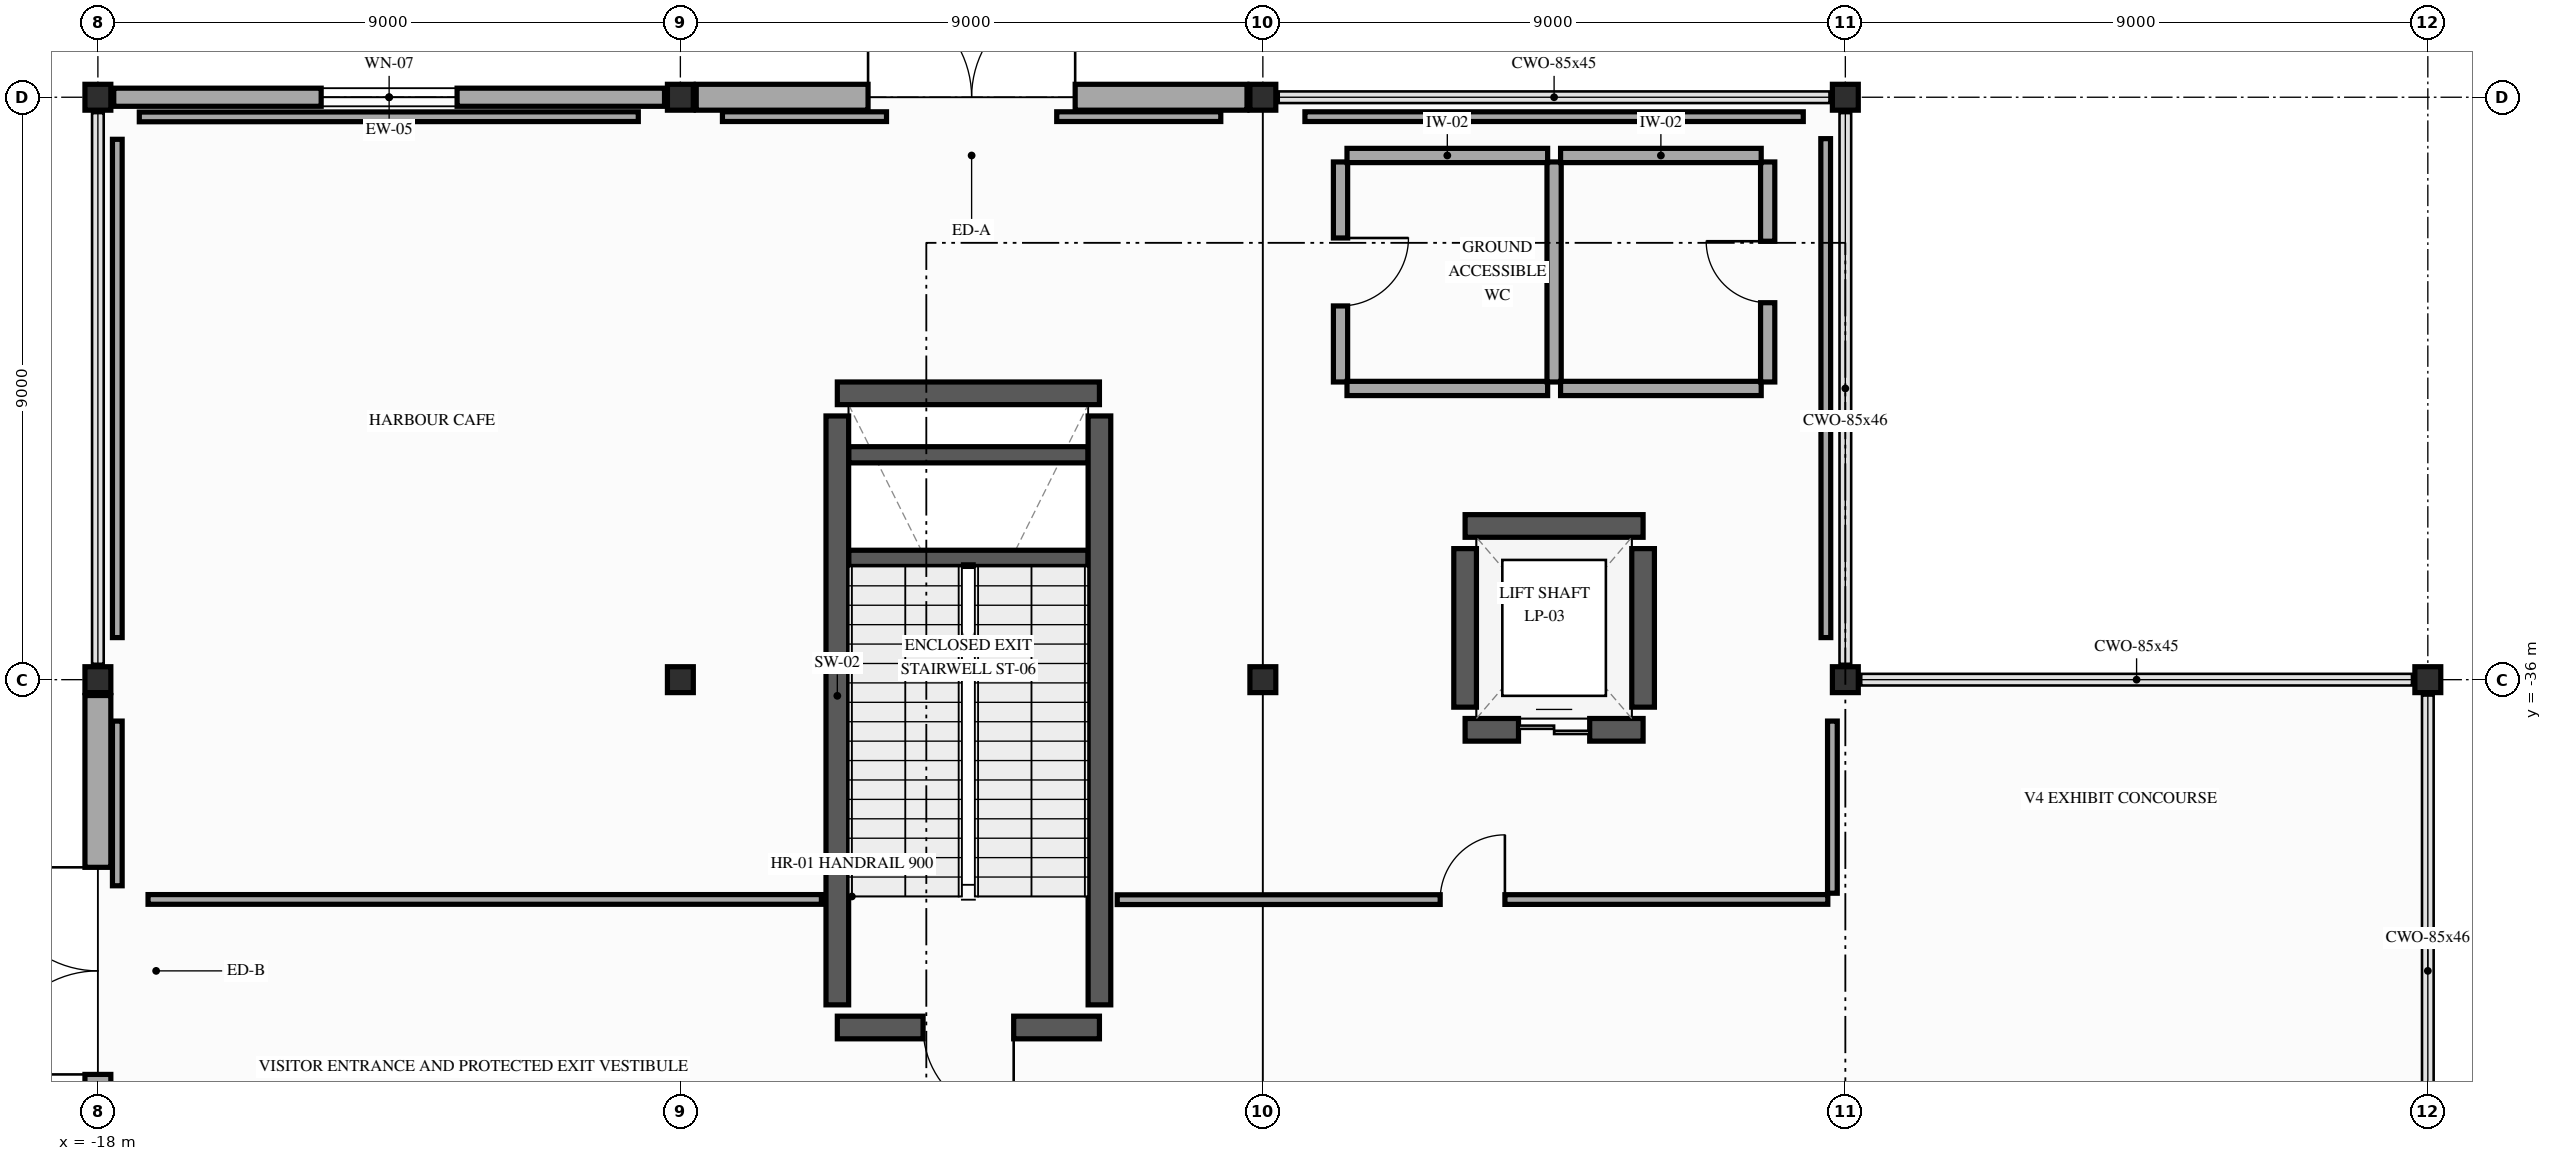
"""IFC4 building model, lengths in metres.
Left out: names, types, materials, properties, quantities, classifications, styles, units other than length and angle.
Written with IfcOpenShell. Run it as: python <this file> out.ifc"""

import sys

from ifc_helpers import new_model, si_unit, direction, frame, frame_2d, origin, origin_2d, place, context, subcontext, project, spatial, rectangle, i_section, extrude, element, fill, save


model = new_model("IFC4")
c1 = context("Model", 3, precision=1e-05, world=origin(), true_north=direction((0.0, 1.0)))
c2 = subcontext(c1, "Body", "Model", "MODEL_VIEW")
j1 = project(units=[si_unit("LENGTHUNIT", "METRE"), si_unit("PLANEANGLEUNIT", "RADIAN")], contexts=[c1])
p1 = place(None, origin())
s1 = spatial("IfcSite", under=j1, at=p1, CompositionType="ELEMENT")
p2 = place(p1, origin())
s2 = spatial("IfcBuilding", under=s1, at=p2, CompositionType="ELEMENT")
p3 = place(p2, origin())
s3 = spatial("IfcBuildingStorey", under=s2, at=p3, CompositionType="ELEMENT", Elevation=0.0)
for number, where, z_axis, x_axis in (
    (1, (-18.0, -36.0, 0.0), (0.0, 0.0, 1.0), (1.0, 0.0, 0.0)),
    (2, (-18.0, -27.0, 0.0), (0.0, 0.0, 1.0), (1.0, 0.0, 0.0)),
    (3, (-9.0, -36.0, 0.0), (0.0, 0.0, 1.0), (1.0, 0.0, 0.0)),
    (4, (-9.0, -27.0, 0.0), (0.0, 0.0, 1.0), (1.0, 0.0, 0.0)),
    (5, (0.0, -36.0, 0.0), (0.0, 0.0, 1.0), (1.0, 0.0, 0.0)),
    (6, (0.0, -27.0, 0.0), (0.0, 0.0, 1.0), (1.0, 0.0, 0.0)),
    (7, (9.0, -36.0, 0.0), (0.0, 0.0, 1.0), (1.0, 0.0, 0.0)),
    (8, (9.0, -27.0, 0.0), (0.0, 0.0, 1.0), (1.0, 0.0, 0.0)),
    (9, (18.0, -36.0, 0.0), (0.0, 0.0, 1.0), (1.0, 0.0, 0.0)),
):
    element("IfcColumn", number, at=place(p3, frame(where, z_axis=z_axis, x_axis=x_axis)), inside=s3, PredefinedType="COLUMN", context=c2, shape_type="SweptSolid", body=[
        extrude(i_section(OverallWidth=0.4, OverallDepth=0.4, WebThickness=0.013, FlangeThickness=0.021, FilletRadius=0.022, at=origin_2d()), origin(), (0.0, 0.0, 1.0), 5.4),
    ])
p4 = place(p3, frame((-17.755, -27.0, 0.0), z_axis=(0.0, 0.0, 1.0), x_axis=(1.0, 0.0, 0.0)))
e10 = element("IfcWall", 10, at=p4, inside=s3, PredefinedType="SOLIDWALL", context=c2, shape_type="SweptSolid", body=[
    extrude(rectangle(XDim=8.51, YDim=0.28, at=frame_2d((4.255, 0.0))), origin(), (0.0, 0.0, 1.0), 4.517),
])
p5 = place(p4, frame((3.205, 0.0, 0.9)))
e11 = element("IfcOpeningElement", 11, at=p5, cuts=e10, PredefinedType="OPENING", context=c2, shape_type="SweptSolid", body=[
    extrude(rectangle(XDim=2.1, YDim=2.6, at=frame_2d((1.05, 1.3))), frame((0.0, 0.15, 0.0), z_axis=(0.0, -1.0, 0.0), x_axis=(1.0, 0.0, 0.0)), (0.0, 0.0, 1.0), 0.3),
])
p6 = place(p3, frame((-8.755, -27.0, 0.0), z_axis=(0.0, 0.0, 1.0), x_axis=(1.0, 0.0, 0.0)))
e12 = element("IfcWall", 12, at=p6, inside=s3, PredefinedType="SOLIDWALL", context=c2, shape_type="SweptSolid", body=[
    extrude(rectangle(XDim=8.51, YDim=0.4, at=frame_2d((4.255, 0.0))), origin(), (0.0, 0.0, 1.0), 4.517),
])
p7 = place(p6, frame((2.655, 0.0, 0.0)))
e13 = element("IfcOpeningElement", 13, at=p7, cuts=e12, PredefinedType="OPENING", context=c2, shape_type="SweptSolid", body=[
    extrude(rectangle(XDim=3.2, YDim=3.0, at=frame_2d((1.6, 1.5))), frame((0.0, 0.21, 0.0), z_axis=(0.0, -1.0, 0.0), x_axis=(1.0, 0.0, 0.0)), (0.0, 0.0, 1.0), 0.42),
])
p8 = place(p3, frame((-18.0, -44.755, 0.0), z_axis=(0.0, 0.0, 1.0), x_axis=(0.0, 1.0, 0.0)))
e14 = element("IfcWall", 14, at=p8, inside=s3, PredefinedType="SOLIDWALL", context=c2, shape_type="SweptSolid", body=[
    extrude(rectangle(XDim=8.51, YDim=0.4, at=frame_2d((4.255, 0.0))), origin(), (0.0, 0.0, 1.0), 4.517),
])
p9 = place(p8, frame((2.655, 0.0, 0.0)))
e15 = element("IfcOpeningElement", 15, at=p9, cuts=e14, PredefinedType="OPENING", context=c2, shape_type="SweptSolid", body=[
    extrude(rectangle(XDim=3.2, YDim=2.8, at=frame_2d((1.6, 1.4))), frame((0.0, 0.21, 0.0), z_axis=(0.0, -1.0, 0.0), x_axis=(1.0, 0.0, 0.0)), (0.0, 0.0, 1.0), 0.42),
])
for number, where, z_axis, x_axis in (
    (16, (-6.4, -34.125, 0.0), (0.0, 0.0, 1.0), (1.0, 0.0, 0.0)),
    (17, (-6.4, -32.525, 0.0), (0.0, 0.0, 1.0), (1.0, 0.0, 0.0)),
):
    element("IfcWall", number, at=place(p3, frame(where, z_axis=z_axis, x_axis=x_axis)), inside=s3, PredefinedType="SHEAR", context=c2, shape_type="SweptSolid", body=[
        extrude(rectangle(XDim=3.7, YDim=0.25, at=frame_2d((1.85, 0.0))), origin(), (0.0, 0.0, 1.0), 2.5),
    ])
p10 = place(p3, frame((-2.525, -41.375, 0.0), z_axis=(0.0, 0.0, 1.0), x_axis=(-1.0, 0.0, 0.0)))
e18 = element("IfcWall", 18, at=p10, inside=s3, PredefinedType="SHEAR", context=c2, shape_type="SweptSolid", body=[
    extrude(rectangle(XDim=4.05, YDim=0.35, at=frame_2d((2.025, 0.0))), origin(), (0.0, 0.0, 1.0), 5.12),
])
p11 = place(p10, frame((1.325, 0.0, 0.0)))
e19 = element("IfcOpeningElement", 19, at=p11, cuts=e18, PredefinedType="OPENING", context=c2, shape_type="SweptSolid", body=[
    extrude(rectangle(XDim=1.4, YDim=2.2, at=frame_2d((0.7, 1.1))), frame((0.0, 0.185, 0.0), z_axis=(0.0, -1.0, 0.0), x_axis=(1.0, 0.0, 0.0)), (0.0, 0.0, 1.0), 0.37),
])
p12 = place(p3, frame((-6.575, -31.575, 0.0), z_axis=(0.0, 0.0, 1.0), x_axis=(1.0, 0.0, 0.0)))
e20 = element("IfcWall", 20, at=p12, inside=s3, PredefinedType="SHEAR", context=c2, shape_type="SweptSolid", body=[
    extrude(rectangle(XDim=4.05, YDim=0.35, at=frame_2d((2.025, 0.0))), origin(), (0.0, 0.0, 1.0), 5.12),
])
for number, where, z_axis, x_axis in (
    (21, (-6.575, -41.025, 0.0), (0.0, 0.0, 1.0), (0.0, 1.0, 0.0)),
    (22, (-2.525, -41.025, 0.0), (0.0, 0.0, 1.0), (0.0, 1.0, 0.0)),
):
    element("IfcWall", number, at=place(p3, frame(where, z_axis=z_axis, x_axis=x_axis)), inside=s3, PredefinedType="SHEAR", context=c2, shape_type="SweptSolid", body=[
        extrude(rectangle(XDim=9.1, YDim=0.35, at=frame_2d((4.55, 0.0))), origin(), (0.0, 0.0, 1.0), 5.12),
    ])
p13 = place(p3, frame((3.125, -36.775, 0.0), z_axis=(0.0, 0.0, 1.0), x_axis=(1.0, 0.0, 0.0)))
e23 = element("IfcWall", 23, at=p13, inside=s3, PredefinedType="SHEAR", context=c2, shape_type="SweptSolid", body=[
    extrude(rectangle(XDim=2.75, YDim=0.35, at=frame_2d((1.375, 0.0))), origin(), (0.0, 0.0, 1.0), 5.12),
])
p14 = place(p13, frame((0.825, 0.0, 0.0)))
e24 = element("IfcOpeningElement", 24, at=p14, cuts=e23, PredefinedType="OPENING", context=c2, shape_type="SweptSolid", body=[
    extrude(rectangle(XDim=1.1, YDim=2.2, at=frame_2d((0.55, 1.1))), frame((0.0, 0.185, 0.0), z_axis=(0.0, -1.0, 0.0), x_axis=(1.0, 0.0, 0.0)), (0.0, 0.0, 1.0), 0.37),
])
p15 = place(p3, frame((5.875, -33.625, 0.0), z_axis=(0.0, 0.0, 1.0), x_axis=(-1.0, 0.0, 0.0)))
e25 = element("IfcWall", 25, at=p15, inside=s3, PredefinedType="SHEAR", context=c2, shape_type="SweptSolid", body=[
    extrude(rectangle(XDim=2.75, YDim=0.35, at=frame_2d((1.375, 0.0))), origin(), (0.0, 0.0, 1.0), 5.12),
])
for number, where, z_axis, x_axis in (
    (26, (3.125, -36.425, 0.0), (0.0, 0.0, 1.0), (0.0, 1.0, 0.0)),
    (27, (5.875, -36.425, 0.0), (0.0, 0.0, 1.0), (0.0, 1.0, 0.0)),
):
    element("IfcWall", number, at=place(p3, frame(where, z_axis=z_axis, x_axis=x_axis)), inside=s3, PredefinedType="SHEAR", context=c2, shape_type="SweptSolid", body=[
        extrude(rectangle(XDim=2.45, YDim=0.35, at=frame_2d((1.225, 0.0))), origin(), (0.0, 0.0, 1.0), 5.12),
    ])
p16 = place(p3, frame((1.2, -28.0, 0.0), z_axis=(0.0, 0.0, 1.0), x_axis=(0.0, -1.0, 0.0)))
e28 = element("IfcWall", 28, at=p16, inside=s3, PredefinedType="PLUMBINGWALL", context=c2, shape_type="SweptSolid", body=[
    extrude(rectangle(XDim=3.4, YDim=0.22, at=frame_2d((1.7, 0.0))), origin(), (0.0, 0.0, 1.0), 4.705),
])
p17 = place(p16, frame((1.175, 0.0, 0.0)))
e29 = element("IfcOpeningElement", 29, at=p17, cuts=e28, PredefinedType="OPENING", context=c2, shape_type="SweptSolid", body=[
    extrude(rectangle(XDim=1.05, YDim=2.15, at=frame_2d((0.525, 1.075))), frame((0.0, 0.12, 0.0), z_axis=(0.0, -1.0, 0.0), x_axis=(1.0, 0.0, 0.0)), (0.0, 0.0, 1.0), 0.24),
])
p18 = place(p3, frame((1.3, -31.5, 0.0), z_axis=(0.0, 0.0, 1.0), x_axis=(1.0, 0.0, 0.0)))
e30 = element("IfcWall", 30, at=p18, inside=s3, PredefinedType="PLUMBINGWALL", context=c2, shape_type="SweptSolid", body=[
    extrude(rectangle(XDim=3.1, YDim=0.22, at=frame_2d((1.55, 0.0))), origin(), (0.0, 0.0, 1.0), 5.05),
])
p19 = place(p3, frame((4.5, -31.4, 0.0), z_axis=(0.0, 0.0, 1.0), x_axis=(0.0, 1.0, 0.0)))
e31 = element("IfcWall", 31, at=p19, inside=s3, PredefinedType="PLUMBINGWALL", context=c2, shape_type="SweptSolid", body=[
    extrude(rectangle(XDim=3.4, YDim=0.22, at=frame_2d((1.7, 0.0))), origin(), (0.0, 0.0, 1.0), 4.705),
])
for number, where, z_axis, x_axis in (
    (32, (4.4, -27.9, 0.0), (0.0, 0.0, 1.0), (-1.0, 0.0, 0.0)),
    (33, (4.6, -31.5, 0.0), (0.0, 0.0, 1.0), (1.0, 0.0, 0.0)),
):
    element("IfcWall", number, at=place(p3, frame(where, z_axis=z_axis, x_axis=x_axis)), inside=s3, PredefinedType="PLUMBINGWALL", context=c2, shape_type="SweptSolid", body=[
        extrude(rectangle(XDim=3.1, YDim=0.22, at=frame_2d((1.55, 0.0))), origin(), (0.0, 0.0, 1.0), 5.05),
    ])
p20 = place(p3, frame((7.8, -31.4, 0.0), z_axis=(0.0, 0.0, 1.0), x_axis=(0.0, 1.0, 0.0)))
e34 = element("IfcWall", 34, at=p20, inside=s3, PredefinedType="PLUMBINGWALL", context=c2, shape_type="SweptSolid", body=[
    extrude(rectangle(XDim=3.4, YDim=0.22, at=frame_2d((1.7, 0.0))), origin(), (0.0, 0.0, 1.0), 4.705),
])
p21 = place(p20, frame((1.225, 0.0, 0.0)))
e35 = element("IfcOpeningElement", 35, at=p21, cuts=e34, PredefinedType="OPENING", context=c2, shape_type="SweptSolid", body=[
    extrude(rectangle(XDim=0.95, YDim=2.15, at=frame_2d((0.475, 1.075))), frame((0.0, 0.12, 0.0), z_axis=(0.0, -1.0, 0.0), x_axis=(1.0, 0.0, 0.0)), (0.0, 0.0, 1.0), 0.24),
])
p22 = place(p3, frame((7.7, -27.9, 0.0), z_axis=(0.0, 0.0, 1.0), x_axis=(-1.0, 0.0, 0.0)))
e36 = element("IfcWall", 36, at=p22, inside=s3, PredefinedType="PLUMBINGWALL", context=c2, shape_type="SweptSolid", body=[
    extrude(rectangle(XDim=3.1, YDim=0.22, at=frame_2d((1.55, 0.0))), origin(), (0.0, 0.0, 1.0), 5.05),
])
p23 = place(p3, frame((-17.7, -36.64, 0.0), z_axis=(0.0, 0.0, 1.0), x_axis=(0.0, -1.0, 0.0)))
e37 = element("IfcWall", 37, at=p23, inside=s3, PredefinedType="PARTITIONING", context=c2, shape_type="SweptSolid", body=[
    extrude(rectangle(XDim=2.545, YDim=0.15, at=frame_2d((1.272, 0.0))), origin(), (0.0, 0.0, 1.0), 4.605),
])
p24 = place(p3, frame((-17.225, -39.396, 0.0), z_axis=(0.0, 0.0, 1.0), x_axis=(1.0, 0.0, 0.0)))
e38 = element("IfcWall", 38, at=p24, inside=s3, PredefinedType="PARTITIONING", context=c2, shape_type="SweptSolid", body=[
    extrude(rectangle(XDim=10.404, YDim=0.15, at=frame_2d((5.202, 0.0))), origin(), (0.0, 0.0, 1.0), 4.605),
])
p25 = place(p3, frame((-2.25, -39.4, 0.0), z_axis=(0.0, 0.0, 1.0), x_axis=(0.999999936706, 0.000355792728, 0.0)))
e39 = element("IfcWall", 39, at=p25, inside=s3, PredefinedType="PARTITIONING", context=c2, shape_type="SweptSolid", body=[
    extrude(rectangle(XDim=10.979, YDim=0.15, at=frame_2d((5.49, 0.0))), origin(), (0.0, 0.0, 1.0), 4.605),
])
p26 = place(p25, frame((4.99, 0.0, 0.0)))
e40 = element("IfcOpeningElement", 40, at=p26, cuts=e39, PredefinedType="OPENING", context=c2, shape_type="SweptSolid", body=[
    extrude(rectangle(XDim=1.0, YDim=2.15, at=frame_2d((0.5, 1.075))), frame((0.0, 0.085, 0.0), z_axis=(0.0, -1.0, 0.0), x_axis=(1.0, 0.0, 0.0)), (0.0, 0.0, 1.0), 0.17),
])
p27 = place(p3, frame((8.8, -39.3, 0.0), z_axis=(0.0, 0.0, 1.0), x_axis=(0.0, 1.0, 0.0)))
e41 = element("IfcWall", 41, at=p27, inside=s3, PredefinedType="PARTITIONING", context=c2, shape_type="SweptSolid", body=[
    extrude(rectangle(XDim=2.66, YDim=0.15, at=frame_2d((1.33, 0.0))), origin(), (0.0, 0.0, 1.0), 4.605),
])
p28 = place(p3, frame((8.7, -35.35, 0.0), z_axis=(0.0, 0.0, 1.0), x_axis=(-0.00050663367, 0.999999871661, 0.0)))
e42 = element("IfcWall", 42, at=p28, inside=s3, PredefinedType="PARTITIONING", context=c2, shape_type="SweptSolid", body=[
    extrude(rectangle(XDim=7.71, YDim=0.15, at=frame_2d((3.855, 0.0))), origin(), (0.0, 0.0, 1.0), 4.617),
])
p29 = place(p3, frame((8.35, -27.3, 0.0), z_axis=(0.0, 0.0, 1.0), x_axis=(-1.0, 0.0, 0.0)))
e43 = element("IfcWall", 43, at=p29, inside=s3, PredefinedType="PARTITIONING", context=c2, shape_type="SweptSolid", body=[
    extrude(rectangle(XDim=7.7, YDim=0.15, at=frame_2d((3.85, 0.0))), origin(), (0.0, 0.0, 1.0), 4.517),
])
for number, where, z_axis, x_axis in (
    (44, (-0.65, -27.3, 0.0), (0.0, 0.0, 1.0), (-1.0, 0.0, 0.0)),
    (45, (-5.815, -27.3, 0.0), (0.0, 0.0, 1.0), (-1.0, 0.0, 0.0)),
):
    element("IfcWall", number, at=place(p3, frame(where, z_axis=z_axis, x_axis=x_axis)), inside=s3, PredefinedType="PARTITIONING", context=c2, shape_type="SweptSolid", body=[
        extrude(rectangle(XDim=2.535, YDim=0.15, at=frame_2d((1.268, 0.0))), origin(), (0.0, 0.0, 1.0), 4.517),
    ])
p30 = place(p3, frame((-9.65, -27.3, 0.0), z_axis=(0.0, 0.0, 1.0), x_axis=(-0.999999871661, -0.00050663367, 0.0)))
e46 = element("IfcWall", 46, at=p30, inside=s3, PredefinedType="PARTITIONING", context=c2, shape_type="SweptSolid", body=[
    extrude(rectangle(XDim=7.71, YDim=0.15, at=frame_2d((3.855, 0.0))), origin(), (0.0, 0.0, 1.0), 4.517),
])
p31 = place(p3, frame((-17.7, -27.65, 0.0), z_axis=(0.0, 0.0, 1.0), x_axis=(0.0, -1.0, 0.0)))
e47 = element("IfcWall", 47, at=p31, inside=s3, PredefinedType="PARTITIONING", context=c2, shape_type="SweptSolid", body=[
    extrude(rectangle(XDim=7.7, YDim=0.15, at=frame_2d((3.85, 0.0))), origin(), (0.0, 0.0, 1.0), 4.617),
])
p32 = place(p5, origin())
e48 = element("IfcWindow", 48, at=p32, inside=s3, PartitioningType="SINGLE_PANEL", PredefinedType="WINDOW", context=c2, shape_type="SweptSolid", body=[
    extrude(rectangle(XDim=2.1, YDim=2.6, at=frame_2d((1.05, 1.3))), frame((0.0, 0.03, 0.0), z_axis=(0.0, -1.0, 0.0), x_axis=(1.0, 0.0, 0.0)), (0.0, 0.0, 1.0), 0.06),
])
fill(e11, e48)
p33 = place(p7, origin())
e49 = element("IfcDoor", 49, at=p33, inside=s3, OperationType="DOUBLE_DOOR_SINGLE_SWING", PredefinedType="DOOR", context=c2, shape_type="SweptSolid", body=[
    extrude(rectangle(XDim=3.2, YDim=3.0, at=frame_2d((1.6, 1.5))), frame((0.0, 0.025, 0.0), z_axis=(0.0, -1.0, 0.0), x_axis=(1.0, 0.0, 0.0)), (0.0, 0.0, 1.0), 0.05),
])
fill(e13, e49)
p34 = place(p9, origin())
e50 = element("IfcDoor", 50, at=p34, inside=s3, OperationType="DOUBLE_DOOR_SINGLE_SWING", PredefinedType="DOOR", context=c2, shape_type="SweptSolid", body=[
    extrude(rectangle(XDim=3.2, YDim=2.8, at=frame_2d((1.6, 1.4))), frame((0.0, 0.025, 0.0), z_axis=(0.0, -1.0, 0.0), x_axis=(1.0, 0.0, 0.0)), (0.0, 0.0, 1.0), 0.05),
])
fill(e15, e50)
p35 = place(p11, origin())
e51 = element("IfcDoor", 51, at=p35, inside=s3, OperationType="SINGLE_SWING_LEFT", PredefinedType="DOOR", context=c2, shape_type="SweptSolid", body=[
    extrude(rectangle(XDim=1.4, YDim=2.2, at=frame_2d((0.7, 1.1))), frame((0.0, 0.025, 0.0), z_axis=(0.0, -1.0, 0.0), x_axis=(1.0, 0.0, 0.0)), (0.0, 0.0, 1.0), 0.05),
])
fill(e19, e51)
p36 = place(p14, origin())
e52 = element("IfcDoor", 52, at=p36, inside=s3, OperationType="DOUBLE_DOOR_SLIDING", PredefinedType="DOOR", context=c2, shape_type="SweptSolid", body=[
    extrude(rectangle(XDim=1.1, YDim=2.2, at=frame_2d((0.55, 1.1))), frame((0.0, 0.025, 0.0), z_axis=(0.0, -1.0, 0.0), x_axis=(1.0, 0.0, 0.0)), (0.0, 0.0, 1.0), 0.05),
])
fill(e24, e52)
p37 = place(p17, origin())
e53 = element("IfcDoor", 53, at=p37, inside=s3, OperationType="SINGLE_SWING_LEFT", PredefinedType="DOOR", context=c2, shape_type="SweptSolid", body=[
    extrude(rectangle(XDim=1.05, YDim=2.15, at=frame_2d((0.525, 1.075))), frame((0.0, 0.025, 0.0), z_axis=(0.0, -1.0, 0.0), x_axis=(1.0, 0.0, 0.0)), (0.0, 0.0, 1.0), 0.05),
])
fill(e29, e53)
p38 = place(p21, origin())
e54 = element("IfcDoor", 54, at=p38, inside=s3, OperationType="SINGLE_SWING_RIGHT", PredefinedType="DOOR", context=c2, shape_type="SweptSolid", body=[
    extrude(rectangle(XDim=0.95, YDim=2.15, at=frame_2d((0.475, 1.075))), frame((0.0, 0.025, 0.0), z_axis=(0.0, -1.0, 0.0), x_axis=(1.0, 0.0, 0.0)), (0.0, 0.0, 1.0), 0.05),
])
fill(e35, e54)
p39 = place(p26, origin())
e55 = element("IfcDoor", 55, at=p39, inside=s3, OperationType="SINGLE_SWING_RIGHT", PredefinedType="DOOR", context=c2, shape_type="SweptSolid", body=[
    extrude(rectangle(XDim=1.0, YDim=2.15, at=frame_2d((0.5, 1.075))), frame((0.0, 0.025, 0.0), z_axis=(0.0, -1.0, 0.0), x_axis=(1.0, 0.0, 0.0)), (0.0, 0.0, 1.0), 0.05),
])
fill(e40, e55)
save(model, sys.argv[1])
